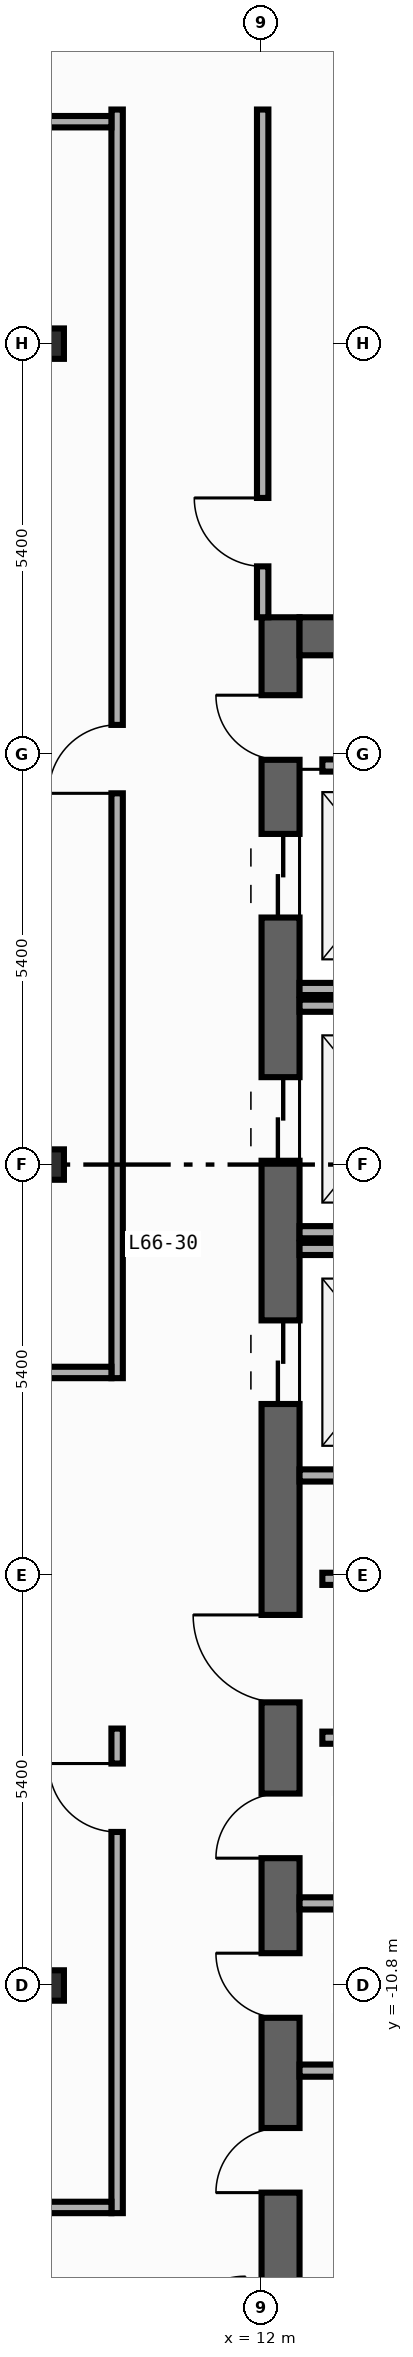
"""IFC4 building model, lengths in metres.
Left out: names, types, materials, properties, quantities, classifications, styles, units other than length and angle.
Written with IfcOpenShell. Run it as: python <this file> out.ifc"""

import sys

from ifc_helpers import new_model, si_unit, direction, frame, frame_2d, origin, origin_2d, place, context, subcontext, project, spatial, rectangle, i_section, extrude, element, fill, save


model = new_model("IFC4")
c1 = context("Model", 3, precision=1e-05, world=origin(), true_north=direction((0.0, 1.0)))
c2 = subcontext(c1, "Body", "Model", "MODEL_VIEW")
j1 = project(units=[si_unit("LENGTHUNIT", "METRE"), si_unit("PLANEANGLEUNIT", "RADIAN")], contexts=[c1])
p1 = place(None, origin())
s1 = spatial("IfcSite", under=j1, at=p1, CompositionType="ELEMENT")
p2 = place(p1, origin())
s2 = spatial("IfcBuilding", under=s1, at=p2, CompositionType="ELEMENT")
p3 = place(p2, frame((0.0, 0.0, 277.6)))
s3 = spatial("IfcBuildingStorey", under=s2, at=p3, CompositionType="ELEMENT", Elevation=277.6)
p4 = place(p3, frame((12.25, -19.8, 0.0), z_axis=(0.0, 0.0, 1.0), x_axis=(0.0, 1.0, 0.0)))
e1 = element("IfcWall", 1, at=p4, inside=s3, PredefinedType="SHEAR", context=c2, shape_type="SweptSolid", body=[
    extrude(rectangle(XDim=27.0, YDim=0.5, at=frame_2d((13.5, 0.0))), origin(), (0.0, 0.0, 1.0), 3.54),
])
p5 = place(p4, frame((23.05, 0.0, 0.0)))
e2 = element("IfcOpeningElement", 2, at=p5, cuts=e1, PredefinedType="OPENING", context=c2, shape_type="SweptSolid", body=[
    extrude(rectangle(XDim=1.1, YDim=2.2, at=frame_2d((0.55, 1.1))), frame((0.0, 0.26, 0.0), z_axis=(0.0, -1.0, 0.0), x_axis=(1.0, 0.0, 0.0)), (0.0, 0.0, 1.0), 0.52),
])
p6 = place(p4, frame((19.85, 0.0, 0.0)))
e3 = element("IfcOpeningElement", 3, at=p6, cuts=e1, PredefinedType="OPENING", context=c2, shape_type="SweptSolid", body=[
    extrude(rectangle(XDim=1.1, YDim=2.2, at=frame_2d((0.55, 1.1))), frame((0.0, 0.26, 0.0), z_axis=(0.0, -1.0, 0.0), x_axis=(1.0, 0.0, 0.0)), (0.0, 0.0, 1.0), 0.52),
])
p7 = place(p4, frame((16.65, 0.0, 0.0)))
e4 = element("IfcOpeningElement", 4, at=p7, cuts=e1, PredefinedType="OPENING", context=c2, shape_type="SweptSolid", body=[
    extrude(rectangle(XDim=1.1, YDim=2.2, at=frame_2d((0.55, 1.1))), frame((0.0, 0.26, 0.0), z_axis=(0.0, -1.0, 0.0), x_axis=(1.0, 0.0, 0.0)), (0.0, 0.0, 1.0), 0.52),
])
p8 = place(p4, frame((6.275, 0.0, 0.0)))
e5 = element("IfcOpeningElement", 5, at=p8, cuts=e1, PredefinedType="OPENING", context=c2, shape_type="SweptSolid", body=[
    extrude(rectangle(XDim=0.85, YDim=2.1, at=frame_2d((0.425, 1.05))), frame((0.0, 0.26, 0.0), z_axis=(0.0, -1.0, 0.0), x_axis=(1.0, 0.0, 0.0)), (0.0, 0.0, 1.0), 0.52),
])
p9 = place(p4, frame((8.575, 0.0, 0.0)))
e6 = element("IfcOpeningElement", 6, at=p9, cuts=e1, PredefinedType="OPENING", context=c2, shape_type="SweptSolid", body=[
    extrude(rectangle(XDim=0.85, YDim=2.1, at=frame_2d((0.425, 1.05))), frame((0.0, 0.26, 0.0), z_axis=(0.0, -1.0, 0.0), x_axis=(1.0, 0.0, 0.0)), (0.0, 0.0, 1.0), 0.52),
])
p10 = place(p4, frame((10.675, 0.0, 0.0)))
e7 = element("IfcOpeningElement", 7, at=p10, cuts=e1, PredefinedType="OPENING", context=c2, shape_type="SweptSolid", body=[
    extrude(rectangle(XDim=0.85, YDim=2.1, at=frame_2d((0.425, 1.05))), frame((0.0, 0.26, 0.0), z_axis=(0.0, -1.0, 0.0), x_axis=(1.0, 0.0, 0.0)), (0.0, 0.0, 1.0), 0.52),
])
p11 = place(p4, frame((12.725, 0.0, 0.0)))
e8 = element("IfcOpeningElement", 8, at=p11, cuts=e1, PredefinedType="OPENING", context=c2, shape_type="SweptSolid", body=[
    extrude(rectangle(XDim=1.15, YDim=2.2, at=frame_2d((0.575, 1.1))), frame((0.0, 0.26, 0.0), z_axis=(0.0, -1.0, 0.0), x_axis=(1.0, 0.0, 0.0)), (0.0, 0.0, 1.0), 0.52),
])
p12 = place(p4, frame((25.125, 0.0, 0.0)))
e9 = element("IfcOpeningElement", 9, at=p12, cuts=e1, PredefinedType="OPENING", context=c2, shape_type="SweptSolid", body=[
    extrude(rectangle(XDim=0.85, YDim=2.1, at=frame_2d((0.425, 1.05))), frame((0.0, 0.26, 0.0), z_axis=(0.0, -1.0, 0.0), x_axis=(1.0, 0.0, 0.0)), (0.0, 0.0, 1.0), 0.52),
])
p13 = place(p3, frame((12.5, 6.95, 0.0), z_axis=(0.0, 0.0, 1.0), x_axis=(1.0, 0.0, 0.0)))
e10 = element("IfcWall", 10, at=p13, inside=s3, PredefinedType="SHEAR", context=c2, shape_type="SweptSolid", body=[
    extrude(rectangle(XDim=7.4, YDim=0.5, at=frame_2d((3.7, 0.0))), origin(), (0.0, 0.0, 1.0), 3.54),
])
for number, where, z_axis, x_axis in (
    (11, (9.2, -10.8, 0.0), (0.0, 0.0, 1.0), (1.0, 0.0, 0.0)),
    (12, (9.2, 0.0, 0.0), (0.0, 0.0, 1.0), (1.0, 0.0, 0.0)),
    (13, (9.2, 10.8, 0.0), (0.0, 0.0, 1.0), (1.0, 0.0, 0.0)),
):
    element("IfcColumn", number, at=place(p3, frame(where, z_axis=z_axis, x_axis=x_axis)), inside=s3, PredefinedType="COLUMN", context=c2, shape_type="SweptSolid", body=[
        extrude(i_section(OverallWidth=0.4, OverallDepth=0.4, WebThickness=0.013, FlangeThickness=0.021, FilletRadius=0.022, at=origin_2d()), origin(), (0.0, 0.0, 1.0), 3.8),
    ])
for number, where, z_axis, x_axis in (
    (14, (12.5, 2.31, 0.0), (0.0, 0.0, 1.0), (1.0, 0.0, 0.0)),
    (15, (12.5, -0.89, 0.0), (0.0, 0.0, 1.0), (1.0, 0.0, 0.0)),
    (16, (12.5, 2.09, 0.0), (0.0, 0.0, 1.0), (1.0, 0.0, 0.0)),
    (17, (12.5, -4.09, 0.0), (0.0, 0.0, 1.0), (1.0, 0.0, 0.0)),
    (18, (12.5, -1.11, 0.0), (0.0, 0.0, 1.0), (1.0, 0.0, 0.0)),
):
    element("IfcWall", number, at=place(p3, frame(where, z_axis=z_axis, x_axis=x_axis)), inside=s3, PredefinedType="STANDARD", context=c2, shape_type="SweptSolid", body=[
        extrude(rectangle(XDim=2.49, YDim=0.16, at=frame_2d((1.245, 0.0))), origin(), (0.0, 0.0, 1.0), 3.54),
    ])
for number, where, z_axis, x_axis in (
    (19, (12.8, -5.45, 0.0), (0.0, 0.0, 1.0), (1.0, 0.0, 0.0)),
    (20, (12.8, -7.54, 0.0), (0.0, 0.0, 1.0), (1.0, 0.0, 0.0)),
    (21, (12.8, 5.25, 0.0), (0.0, 0.0, 1.0), (1.0, 0.0, 0.0)),
):
    element("IfcWall", number, at=place(p3, frame(where, z_axis=z_axis, x_axis=x_axis)), inside=s3, PredefinedType="STANDARD", context=c2, shape_type="SweptSolid", body=[
        extrude(rectangle(XDim=2.6, YDim=0.16, at=frame_2d((1.3, 0.0))), origin(), (0.0, 0.0, 1.0), 3.54),
    ])
for number, where, z_axis, x_axis in (
    (22, (12.5, -11.92, 0.0), (0.0, 0.0, 1.0), (1.0, 0.0, 0.0)),
    (23, (12.5, -9.72, 0.0), (0.0, 0.0, 1.0), (1.0, 0.0, 0.0)),
):
    element("IfcWall", number, at=place(p3, frame(where, z_axis=z_axis, x_axis=x_axis)), inside=s3, PredefinedType="PARTITIONING", context=c2, shape_type="SweptSolid", body=[
        extrude(rectangle(XDim=2.9, YDim=0.16, at=frame_2d((1.45, 0.0))), origin(), (0.0, 0.0, 1.0), 3.54),
    ])
p14 = place(p3, frame((12.015, 7.2, 0.0), z_axis=(0.0, 0.0, 1.0), x_axis=(0.0, 1.0, 0.0)))
e24 = element("IfcWall", 24, at=p14, inside=s3, PredefinedType="PARTITIONING", context=c2, shape_type="SweptSolid", body=[
    extrude(rectangle(XDim=6.68, YDim=0.15, at=frame_2d((3.34, 0.0))), origin(), (0.0, 0.0, 1.0), 3.54),
])
p15 = place(p14, frame((0.67, 0.0, 0.0)))
e25 = element("IfcOpeningElement", 25, at=p15, cuts=e24, PredefinedType="OPENING", context=c2, shape_type="SweptSolid", body=[
    extrude(rectangle(XDim=0.9, YDim=2.15, at=frame_2d((0.45, 1.075))), frame((0.0, 0.085, 0.0), z_axis=(0.0, -1.0, 0.0), x_axis=(1.0, 0.0, 0.0)), (0.0, 0.0, 1.0), 0.17),
])
p16 = place(p3, frame((10.1, -2.81, 0.0), z_axis=(0.0, 0.0, 1.0), x_axis=(0.0, 1.0, 0.0)))
e26 = element("IfcWall", 26, at=p16, inside=s3, PredefinedType="PARTITIONING", context=c2, shape_type="SweptSolid", body=[
    extrude(rectangle(XDim=16.69, YDim=0.15, at=frame_2d((8.345, 0.0))), origin(), (0.0, 0.0, 1.0), 3.54),
])
p17 = place(p16, frame((7.694, 0.0, 0.0)))
e27 = element("IfcOpeningElement", 27, at=p17, cuts=e26, PredefinedType="OPENING", context=c2, shape_type="SweptSolid", body=[
    extrude(rectangle(XDim=0.9, YDim=2.15, at=frame_2d((0.45, 1.075))), frame((0.0, 0.085, 0.0), z_axis=(0.0, -1.0, 0.0), x_axis=(1.0, 0.0, 0.0)), (0.0, 0.0, 1.0), 0.17),
])
p18 = place(p3, frame((10.1, -13.795, 0.0), z_axis=(0.0, 0.0, 1.0), x_axis=(0.0, 1.0, 0.0)))
e28 = element("IfcWall", 28, at=p18, inside=s3, PredefinedType="PARTITIONING", context=c2, shape_type="SweptSolid", body=[
    extrude(rectangle(XDim=6.375, YDim=0.15, at=frame_2d((3.188, 0.0))), origin(), (0.0, 0.0, 1.0), 3.54),
])
p19 = place(p18, frame((5.015, 0.0, 0.0)))
e29 = element("IfcOpeningElement", 29, at=p19, cuts=e28, PredefinedType="OPENING", context=c2, shape_type="SweptSolid", body=[
    extrude(rectangle(XDim=0.9, YDim=2.15, at=frame_2d((0.45, 1.075))), frame((0.0, 0.085, 0.0), z_axis=(0.0, -1.0, 0.0), x_axis=(1.0, 0.0, 0.0)), (0.0, 0.0, 1.0), 0.17),
])
p20 = place(p3, frame((-3.01, -2.735, 0.0), z_axis=(0.0, 0.0, 1.0), x_axis=(1.0, 0.0, 0.0)))
e30 = element("IfcWall", 30, at=p20, inside=s3, PredefinedType="PARTITIONING", context=c2, shape_type="SweptSolid", body=[
    extrude(rectangle(XDim=13.035, YDim=0.15, at=frame_2d((6.518, 0.0))), origin(), (0.0, 0.0, 1.0), 3.54),
])
p21 = place(p20, frame((2.463, 0.0, 0.0)))
e31 = element("IfcOpeningElement", 31, at=p21, cuts=e30, PredefinedType="OPENING", context=c2, shape_type="SweptSolid", body=[
    extrude(rectangle(XDim=0.9, YDim=2.15, at=frame_2d((0.45, 1.075))), frame((0.0, 0.085, 0.0), z_axis=(0.0, -1.0, 0.0), x_axis=(1.0, 0.0, 0.0)), (0.0, 0.0, 1.0), 0.17),
])
p22 = place(p3, frame((-2.86, 13.72, 0.0), z_axis=(0.0, 0.0, 1.0), x_axis=(1.0, 0.0, 0.0)))
e32 = element("IfcWall", 32, at=p22, inside=s3, PredefinedType="PARTITIONING", context=c2, shape_type="SweptSolid", body=[
    extrude(rectangle(XDim=12.885, YDim=0.15, at=frame_2d((6.442, 0.0))), origin(), (0.0, 0.0, 1.0), 3.54),
])
p23 = place(p22, frame((4.692, 0.0, 0.0)))
e33 = element("IfcOpeningElement", 33, at=p23, cuts=e32, PredefinedType="OPENING", context=c2, shape_type="SweptSolid", body=[
    extrude(rectangle(XDim=0.9, YDim=2.15, at=frame_2d((0.45, 1.075))), frame((0.0, 0.085, 0.0), z_axis=(0.0, -1.0, 0.0), x_axis=(1.0, 0.0, 0.0)), (0.0, 0.0, 1.0), 0.17),
])
p24 = place(p3, frame((-3.03, -13.72, 0.0), z_axis=(0.0, 0.0, 1.0), x_axis=(1.0, 0.0, 0.0)))
e34 = element("IfcWall", 34, at=p24, inside=s3, PredefinedType="PARTITIONING", context=c2, shape_type="SweptSolid", body=[
    extrude(rectangle(XDim=13.055, YDim=0.15, at=frame_2d((6.527, 0.0))), origin(), (0.0, 0.0, 1.0), 3.54),
])
p25 = place(p24, frame((4.874, 0.0, 0.0)))
e35 = element("IfcOpeningElement", 35, at=p25, cuts=e34, PredefinedType="OPENING", context=c2, shape_type="SweptSolid", body=[
    extrude(rectangle(XDim=0.9, YDim=2.15, at=frame_2d((0.45, 1.075))), frame((0.0, 0.085, 0.0), z_axis=(0.0, -1.0, 0.0), x_axis=(1.0, 0.0, 0.0)), (0.0, 0.0, 1.0), 0.17),
])
p26 = place(p5, origin())
e36 = element("IfcDoor", 36, at=p26, inside=s3, OperationType="DOUBLE_DOOR_SLIDING", PredefinedType="DOOR", context=c2, shape_type="SweptSolid", body=[
    extrude(rectangle(XDim=1.1, YDim=2.2, at=frame_2d((0.55, 1.1))), frame((0.0, 0.025, 0.0), z_axis=(0.0, -1.0, 0.0), x_axis=(1.0, 0.0, 0.0)), (0.0, 0.0, 1.0), 0.05),
])
fill(e2, e36)
p27 = place(p6, origin())
e37 = element("IfcDoor", 37, at=p27, inside=s3, OperationType="DOUBLE_DOOR_SLIDING", PredefinedType="DOOR", context=c2, shape_type="SweptSolid", body=[
    extrude(rectangle(XDim=1.1, YDim=2.2, at=frame_2d((0.55, 1.1))), frame((0.0, 0.025, 0.0), z_axis=(0.0, -1.0, 0.0), x_axis=(1.0, 0.0, 0.0)), (0.0, 0.0, 1.0), 0.05),
])
fill(e3, e37)
p28 = place(p7, origin())
e38 = element("IfcDoor", 38, at=p28, inside=s3, OperationType="DOUBLE_DOOR_SLIDING", PredefinedType="DOOR", context=c2, shape_type="SweptSolid", body=[
    extrude(rectangle(XDim=1.1, YDim=2.2, at=frame_2d((0.55, 1.1))), frame((0.0, 0.025, 0.0), z_axis=(0.0, -1.0, 0.0), x_axis=(1.0, 0.0, 0.0)), (0.0, 0.0, 1.0), 0.05),
])
fill(e4, e38)
p29 = place(p8, origin())
e39 = element("IfcDoor", 39, at=p29, inside=s3, OperationType="SINGLE_SWING_LEFT", PredefinedType="DOOR", context=c2, shape_type="SweptSolid", body=[
    extrude(rectangle(XDim=0.85, YDim=2.1, at=frame_2d((0.425, 1.05))), frame((0.0, 0.025, 0.0), z_axis=(0.0, -1.0, 0.0), x_axis=(1.0, 0.0, 0.0)), (0.0, 0.0, 1.0), 0.05),
])
fill(e5, e39)
p30 = place(p9, origin())
e40 = element("IfcDoor", 40, at=p30, inside=s3, OperationType="SINGLE_SWING_RIGHT", PredefinedType="DOOR", context=c2, shape_type="SweptSolid", body=[
    extrude(rectangle(XDim=0.85, YDim=2.1, at=frame_2d((0.425, 1.05))), frame((0.0, 0.025, 0.0), z_axis=(0.0, -1.0, 0.0), x_axis=(1.0, 0.0, 0.0)), (0.0, 0.0, 1.0), 0.05),
])
fill(e6, e40)
p31 = place(p10, origin())
e41 = element("IfcDoor", 41, at=p31, inside=s3, OperationType="SINGLE_SWING_LEFT", PredefinedType="DOOR", context=c2, shape_type="SweptSolid", body=[
    extrude(rectangle(XDim=0.85, YDim=2.1, at=frame_2d((0.425, 1.05))), frame((0.0, 0.025, 0.0), z_axis=(0.0, -1.0, 0.0), x_axis=(1.0, 0.0, 0.0)), (0.0, 0.0, 1.0), 0.05),
])
fill(e7, e41)
p32 = place(p11, origin())
e42 = element("IfcDoor", 42, at=p32, inside=s3, OperationType="SINGLE_SWING_RIGHT", PredefinedType="DOOR", context=c2, shape_type="SweptSolid", body=[
    extrude(rectangle(XDim=1.15, YDim=2.2, at=frame_2d((0.575, 1.1))), frame((0.0, 0.025, 0.0), z_axis=(0.0, -1.0, 0.0), x_axis=(1.0, 0.0, 0.0)), (0.0, 0.0, 1.0), 0.05),
])
fill(e8, e42)
p33 = place(p12, origin())
e43 = element("IfcDoor", 43, at=p33, inside=s3, OperationType="SINGLE_SWING_RIGHT", PredefinedType="DOOR", context=c2, shape_type="SweptSolid", body=[
    extrude(rectangle(XDim=0.85, YDim=2.1, at=frame_2d((0.425, 1.05))), frame((0.0, 0.025, 0.0), z_axis=(0.0, -1.0, 0.0), x_axis=(1.0, 0.0, 0.0)), (0.0, 0.0, 1.0), 0.05),
])
fill(e9, e43)
p34 = place(p15, origin())
e44 = element("IfcDoor", 44, at=p34, inside=s3, OperationType="SINGLE_SWING_RIGHT", PredefinedType="DOOR", context=c2, shape_type="SweptSolid", body=[
    extrude(rectangle(XDim=0.9, YDim=2.15, at=frame_2d((0.45, 1.075))), frame((0.0, 0.025, 0.0), z_axis=(0.0, -1.0, 0.0), x_axis=(1.0, 0.0, 0.0)), (0.0, 0.0, 1.0), 0.05),
])
fill(e25, e44)
p35 = place(p17, origin())
e45 = element("IfcDoor", 45, at=p35, inside=s3, OperationType="SINGLE_SWING_LEFT", PredefinedType="DOOR", context=c2, shape_type="SweptSolid", body=[
    extrude(rectangle(XDim=0.9, YDim=2.15, at=frame_2d((0.45, 1.075))), frame((0.0, 0.025, 0.0), z_axis=(0.0, -1.0, 0.0), x_axis=(1.0, 0.0, 0.0)), (0.0, 0.0, 1.0), 0.05),
])
fill(e27, e45)
p36 = place(p19, origin())
e46 = element("IfcDoor", 46, at=p36, inside=s3, OperationType="SINGLE_SWING_RIGHT", PredefinedType="DOOR", context=c2, shape_type="SweptSolid", body=[
    extrude(rectangle(XDim=0.9, YDim=2.15, at=frame_2d((0.45, 1.075))), frame((0.0, 0.025, 0.0), z_axis=(0.0, -1.0, 0.0), x_axis=(1.0, 0.0, 0.0)), (0.0, 0.0, 1.0), 0.05),
])
fill(e29, e46)
save(model, sys.argv[1])
